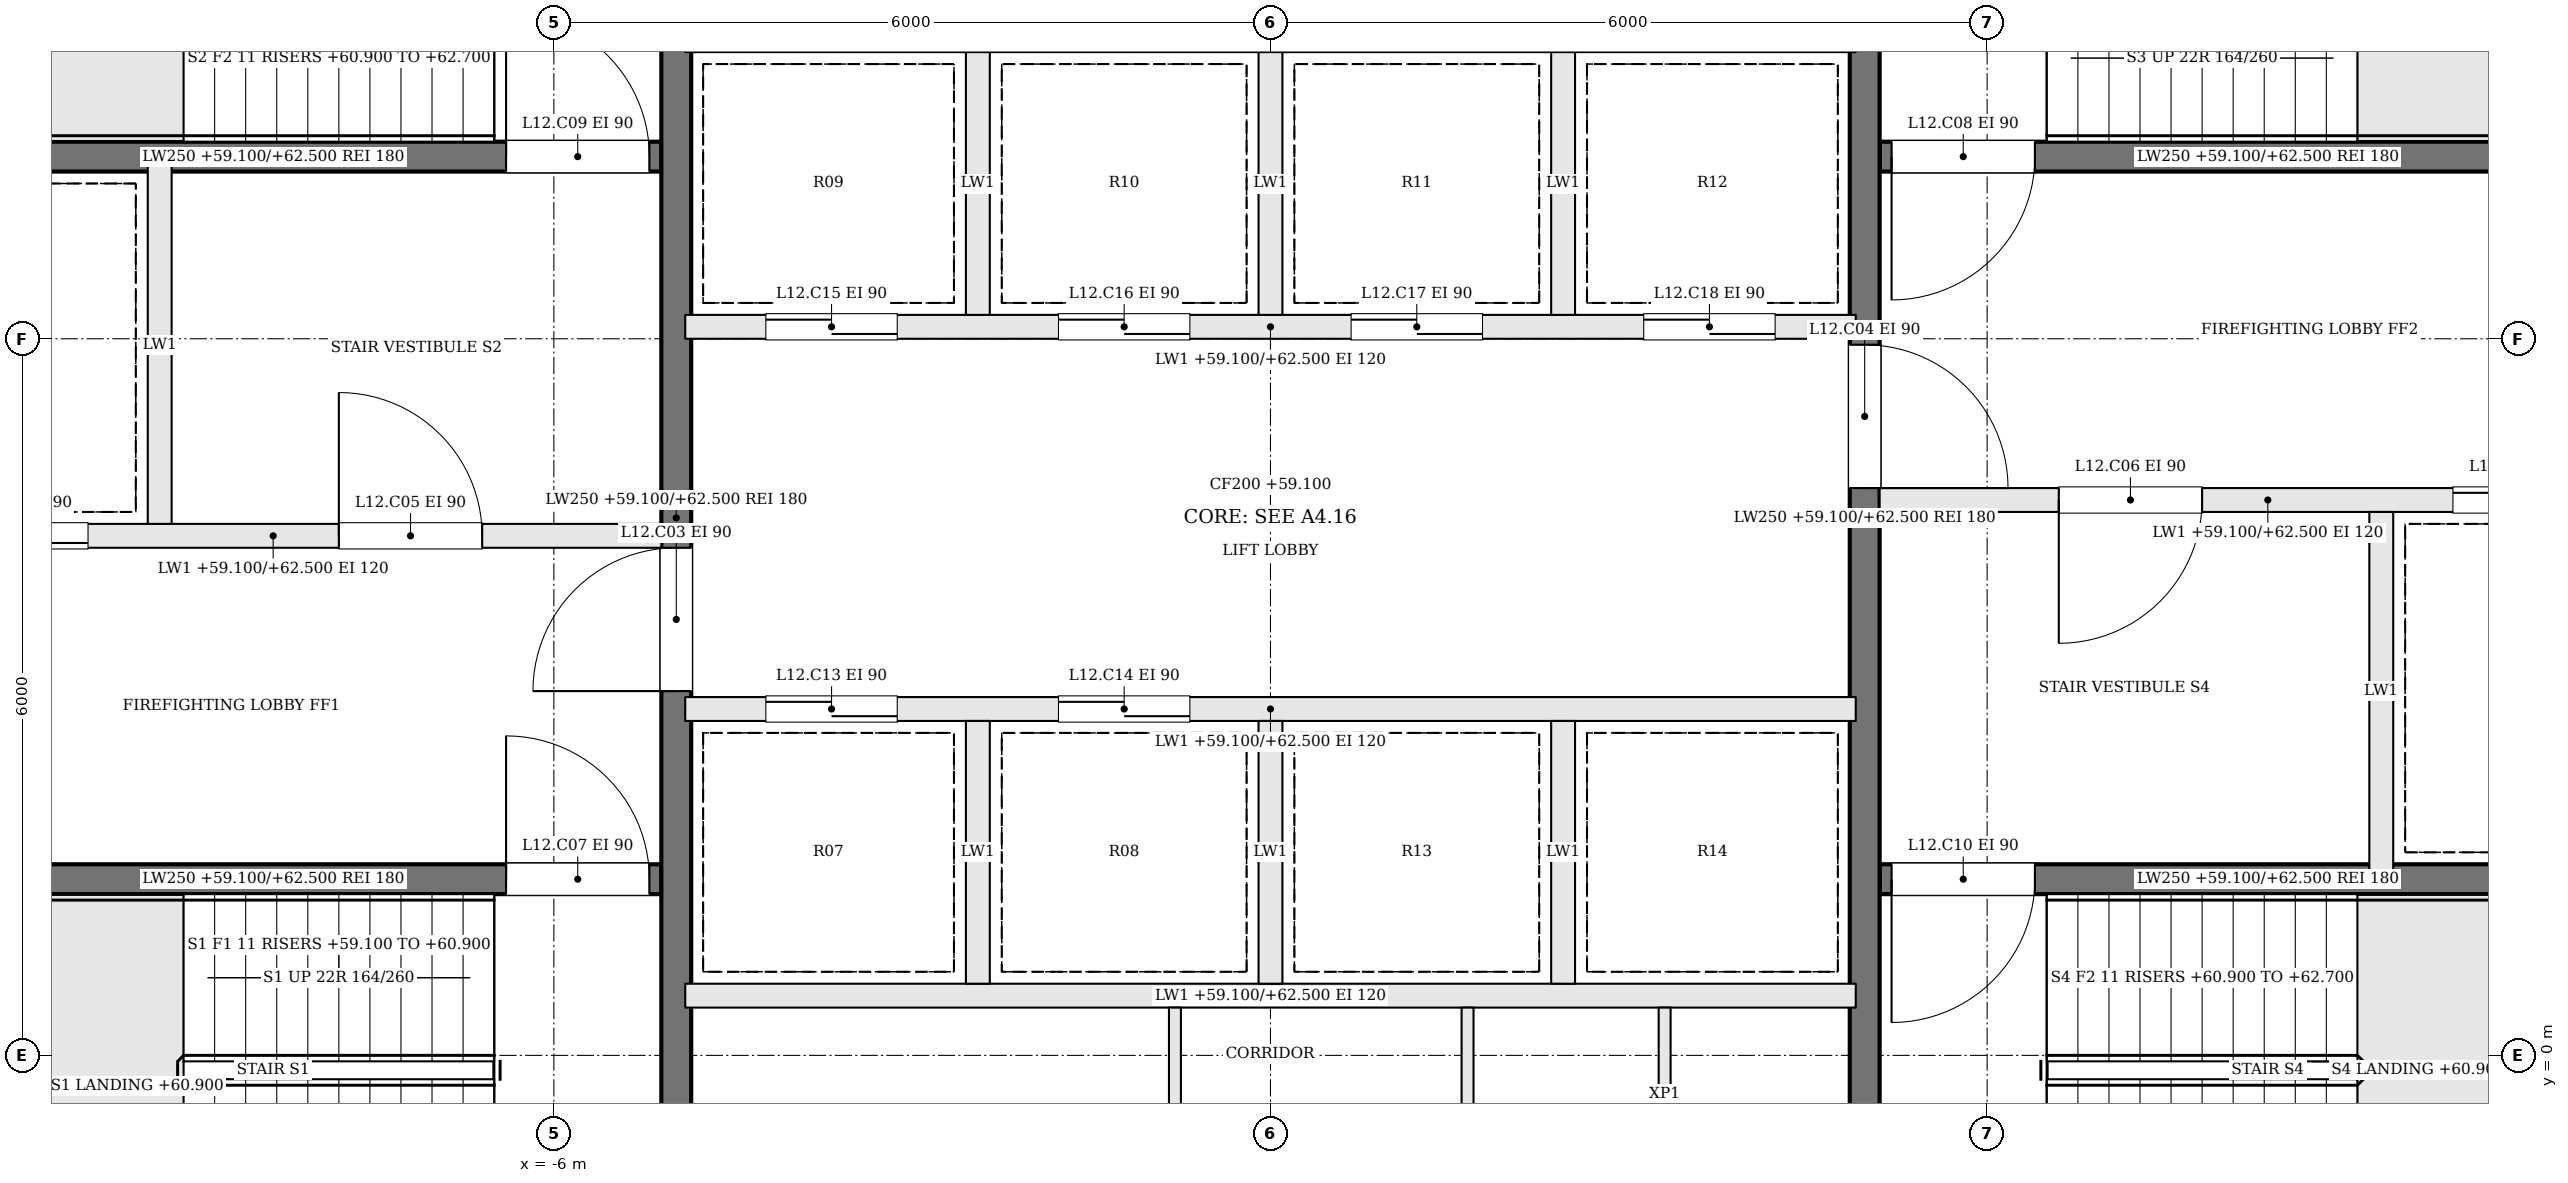
"""IFC4 building model, lengths in metres.
Left out: names, types, materials, properties, quantities, classifications, styles, units other than length and angle.
Written with IfcOpenShell. Run it as: python <this file> out.ifc"""

import sys

from ifc_helpers import new_model, si_unit, direction, frame, frame_2d, origin, place, context, subcontext, project, spatial, rectangle, extrude, element, fill, save


model = new_model("IFC4")
c1 = context("Model", 3, precision=1e-05, world=origin(), true_north=direction((0.0, 1.0)))
c2 = subcontext(c1, "Body", "Model", "MODEL_VIEW")
j1 = project(units=[si_unit("LENGTHUNIT", "METRE"), si_unit("PLANEANGLEUNIT", "RADIAN")], contexts=[c1])
p1 = place(None, origin())
s1 = spatial("IfcSite", under=j1, at=p1, CompositionType="ELEMENT")
p2 = place(p1, origin())
s2 = spatial("IfcBuilding", under=s1, at=p2, CompositionType="ELEMENT")
p3 = place(p2, frame((0.0, 0.0, 59.1)))
s3 = spatial("IfcBuildingStorey", under=s2, at=p3, CompositionType="ELEMENT", Elevation=59.1)
p4 = place(p3, frame((-11.6, 1.475, 0.0), z_axis=(0.0, 0.0, 1.0), x_axis=(1.0, 0.0, 0.0)))
e1 = element("IfcWall", 1, at=p4, inside=s3, PredefinedType="SOLIDWALL", context=c2, shape_type="SweptSolid", body=[
    extrude(rectangle(XDim=6.5, YDim=0.25, at=frame_2d((3.25, 0.0))), origin(), (0.0, 0.0, 1.0), 3.4),
])
p5 = place(p4, frame((5.2, 0.0, 0.0)))
e2 = element("IfcOpeningElement", 2, at=p5, cuts=e1, PredefinedType="OPENING", context=c2, shape_type="SweptSolid", body=[
    extrude(rectangle(XDim=1.2, YDim=2.1, at=frame_2d((0.6, 1.05))), frame((0.0, 0.135, 0.0), z_axis=(0.0, -1.0, 0.0), x_axis=(1.0, 0.0, 0.0)), (0.0, 0.0, 1.0), 0.27),
])
p6 = place(p3, frame((11.6, 7.525, 0.0), z_axis=(0.0, 0.0, 1.0), x_axis=(-1.0, 0.0, 0.0)))
e3 = element("IfcWall", 3, at=p6, inside=s3, PredefinedType="SOLIDWALL", context=c2, shape_type="SweptSolid", body=[
    extrude(rectangle(XDim=6.5, YDim=0.25, at=frame_2d((3.25, 0.0))), origin(), (0.0, 0.0, 1.0), 3.4),
])
p7 = place(p6, frame((5.2, 0.0, 0.0)))
e4 = element("IfcOpeningElement", 4, at=p7, cuts=e3, PredefinedType="OPENING", context=c2, shape_type="SweptSolid", body=[
    extrude(rectangle(XDim=1.2, YDim=2.1, at=frame_2d((0.6, 1.05))), frame((0.0, 0.135, 0.0), z_axis=(0.0, -1.0, 0.0), x_axis=(1.0, 0.0, 0.0)), (0.0, 0.0, 1.0), 0.27),
])
p8 = place(p3, frame((-11.6, 4.35, 0.0), z_axis=(0.0, 0.0, 1.0), x_axis=(1.0, 0.0, 0.0)))
e5 = element("IfcWall", 5, at=p8, inside=s3, PredefinedType="SOLIDWALL", context=c2, shape_type="SweptSolid", body=[
    extrude(rectangle(XDim=6.5, YDim=0.2, at=frame_2d((3.25, 0.0))), origin(), (0.0, 0.0, 1.0), 3.4),
])
p9 = place(p8, frame((3.8, 0.0, 0.0)))
e6 = element("IfcOpeningElement", 6, at=p9, cuts=e5, PredefinedType="OPENING", context=c2, shape_type="SweptSolid", body=[
    extrude(rectangle(XDim=1.2, YDim=2.1, at=frame_2d((0.6, 1.05))), frame((0.0, 0.11, 0.0), z_axis=(0.0, -1.0, 0.0), x_axis=(1.0, 0.0, 0.0)), (0.0, 0.0, 1.0), 0.22),
])
p10 = place(p8, frame((0.5, 0.0, 0.0)))
e7 = element("IfcOpeningElement", 7, at=p10, cuts=e5, PredefinedType="OPENING", context=c2, shape_type="SweptSolid", body=[
    extrude(rectangle(XDim=1.2, YDim=2.1, at=frame_2d((0.6, 1.05))), frame((0.0, 0.11, 0.0), z_axis=(0.0, -1.0, 0.0), x_axis=(1.0, 0.0, 0.0)), (0.0, 0.0, 1.0), 0.22),
])
p11 = place(p3, frame((11.6, 4.65, 0.0), z_axis=(0.0, 0.0, 1.0), x_axis=(-1.0, 0.0, 0.0)))
e8 = element("IfcWall", 8, at=p11, inside=s3, PredefinedType="SOLIDWALL", context=c2, shape_type="SweptSolid", body=[
    extrude(rectangle(XDim=6.5, YDim=0.2, at=frame_2d((3.25, 0.0))), origin(), (0.0, 0.0, 1.0), 3.4),
])
p12 = place(p11, frame((3.8, 0.0, 0.0)))
e9 = element("IfcOpeningElement", 9, at=p12, cuts=e8, PredefinedType="OPENING", context=c2, shape_type="SweptSolid", body=[
    extrude(rectangle(XDim=1.2, YDim=2.1, at=frame_2d((0.6, 1.05))), frame((0.0, 0.11, 0.0), z_axis=(0.0, -1.0, 0.0), x_axis=(1.0, 0.0, 0.0)), (0.0, 0.0, 1.0), 0.22),
])
p13 = place(p11, frame((0.5, 0.0, 0.0)))
e10 = element("IfcOpeningElement", 10, at=p13, cuts=e8, PredefinedType="OPENING", context=c2, shape_type="SweptSolid", body=[
    extrude(rectangle(XDim=1.2, YDim=2.1, at=frame_2d((0.6, 1.05))), frame((0.0, 0.11, 0.0), z_axis=(0.0, -1.0, 0.0), x_axis=(1.0, 0.0, 0.0)), (0.0, 0.0, 1.0), 0.22),
])
p14 = place(p3, frame((-11.6, 7.525, 0.0), z_axis=(0.0, 0.0, 1.0), x_axis=(1.0, 0.0, 0.0)))
e11 = element("IfcWall", 11, at=p14, inside=s3, PredefinedType="SOLIDWALL", context=c2, shape_type="SweptSolid", body=[
    extrude(rectangle(XDim=6.5, YDim=0.25, at=frame_2d((3.25, 0.0))), origin(), (0.0, 0.0, 1.0), 3.4),
])
p15 = place(p14, frame((5.2, 0.0, 0.0)))
e12 = element("IfcOpeningElement", 12, at=p15, cuts=e11, PredefinedType="OPENING", context=c2, shape_type="SweptSolid", body=[
    extrude(rectangle(XDim=1.2, YDim=2.1, at=frame_2d((0.6, 1.05))), frame((0.0, 0.135, 0.0), z_axis=(0.0, -1.0, 0.0), x_axis=(1.0, 0.0, 0.0)), (0.0, 0.0, 1.0), 0.27),
])
p16 = place(p3, frame((11.6, 1.475, 0.0), z_axis=(0.0, 0.0, 1.0), x_axis=(-1.0, 0.0, 0.0)))
e13 = element("IfcWall", 13, at=p16, inside=s3, PredefinedType="SOLIDWALL", context=c2, shape_type="SweptSolid", body=[
    extrude(rectangle(XDim=6.5, YDim=0.25, at=frame_2d((3.25, 0.0))), origin(), (0.0, 0.0, 1.0), 3.4),
])
p17 = place(p16, frame((5.2, 0.0, 0.0)))
e14 = element("IfcOpeningElement", 14, at=p17, cuts=e13, PredefinedType="OPENING", context=c2, shape_type="SweptSolid", body=[
    extrude(rectangle(XDim=1.2, YDim=2.1, at=frame_2d((0.6, 1.05))), frame((0.0, 0.135, 0.0), z_axis=(0.0, -1.0, 0.0), x_axis=(1.0, 0.0, 0.0)), (0.0, 0.0, 1.0), 0.27),
])
for number, where, z_axis, x_axis in (
    (15, (-9.3, 4.45, 0.0), (0.0, 0.0, 1.0), (0.0, 1.0, 0.0)),
    (16, (9.3, 4.55, 0.0), (0.0, 0.0, 1.0), (0.0, -1.0, 0.0)),
):
    element("IfcWall", number, at=place(p3, frame(where, z_axis=z_axis, x_axis=x_axis)), inside=s3, PredefinedType="SOLIDWALL", context=c2, shape_type="SweptSolid", body=[
        extrude(rectangle(XDim=3.0, YDim=0.2, at=frame_2d((1.5, 0.0))), origin(), (0.0, 0.0, 1.0), 3.4),
    ])
p18 = place(p3, frame((-4.975, -1.6, 0.0), z_axis=(0.0, 0.0, 1.0), x_axis=(0.0, 1.0, 0.0)))
e17 = element("IfcWall", 17, at=p18, inside=s3, PredefinedType="SOLIDWALL", context=c2, shape_type="SweptSolid", body=[
    extrude(rectangle(XDim=12.2, YDim=0.25, at=frame_2d((6.1, 0.0))), origin(), (0.0, 0.0, 1.0), 3.4),
])
p19 = place(p18, frame((4.65, 0.0, 0.0)))
e18 = element("IfcOpeningElement", 18, at=p19, cuts=e17, PredefinedType="OPENING", context=c2, shape_type="SweptSolid", body=[
    extrude(rectangle(XDim=1.2, YDim=2.1, at=frame_2d((0.6, 1.05))), frame((0.0, 0.135, 0.0), z_axis=(0.0, -1.0, 0.0), x_axis=(1.0, 0.0, 0.0)), (0.0, 0.0, 1.0), 0.27),
])
p20 = place(p3, frame((4.975, 10.6, 0.0), z_axis=(0.0, 0.0, 1.0), x_axis=(0.0, -1.0, 0.0)))
e19 = element("IfcWall", 19, at=p20, inside=s3, PredefinedType="SOLIDWALL", context=c2, shape_type="SweptSolid", body=[
    extrude(rectangle(XDim=12.2, YDim=0.25, at=frame_2d((6.1, 0.0))), origin(), (0.0, 0.0, 1.0), 3.4),
])
p21 = place(p20, frame((4.65, 0.0, 0.0)))
e20 = element("IfcOpeningElement", 20, at=p21, cuts=e19, PredefinedType="OPENING", context=c2, shape_type="SweptSolid", body=[
    extrude(rectangle(XDim=1.2, YDim=2.1, at=frame_2d((0.6, 1.05))), frame((0.0, 0.135, 0.0), z_axis=(0.0, -1.0, 0.0), x_axis=(1.0, 0.0, 0.0)), (0.0, 0.0, 1.0), 0.27),
])
p22 = place(p3, frame((-4.9, 0.5, 0.0), z_axis=(0.0, 0.0, 1.0), x_axis=(1.0, 0.0, 0.0)))
e21 = element("IfcWall", 21, at=p22, inside=s3, PredefinedType="SOLIDWALL", context=c2, shape_type="SweptSolid", body=[
    extrude(rectangle(XDim=9.8, YDim=0.2, at=frame_2d((4.9, 0.0))), origin(), (0.0, 0.0, 1.0), 3.4),
])
p23 = place(p3, frame((-4.9, 2.9, 0.0), z_axis=(0.0, 0.0, 1.0), x_axis=(1.0, 0.0, 0.0)))
e22 = element("IfcWall", 22, at=p23, inside=s3, PredefinedType="SOLIDWALL", context=c2, shape_type="SweptSolid", body=[
    extrude(rectangle(XDim=9.8, YDim=0.2, at=frame_2d((4.9, 0.0))), origin(), (0.0, 0.0, 1.0), 3.4),
])
p24 = place(p23, frame((0.675, 0.0, 0.0)))
e23 = element("IfcOpeningElement", 23, at=p24, cuts=e22, PredefinedType="OPENING", context=c2, shape_type="SweptSolid", body=[
    extrude(rectangle(XDim=1.1, YDim=2.1, at=frame_2d((0.55, 1.05))), frame((0.0, 0.11, 0.0), z_axis=(0.0, -1.0, 0.0), x_axis=(1.0, 0.0, 0.0)), (0.0, 0.0, 1.0), 0.22),
])
p25 = place(p23, frame((3.125, 0.0, 0.0)))
e24 = element("IfcOpeningElement", 24, at=p25, cuts=e22, PredefinedType="OPENING", context=c2, shape_type="SweptSolid", body=[
    extrude(rectangle(XDim=1.1, YDim=2.1, at=frame_2d((0.55, 1.05))), frame((0.0, 0.11, 0.0), z_axis=(0.0, -1.0, 0.0), x_axis=(1.0, 0.0, 0.0)), (0.0, 0.0, 1.0), 0.22),
])
p26 = place(p3, frame((-4.9, 6.1, 0.0), z_axis=(0.0, 0.0, 1.0), x_axis=(1.0, 0.0, 0.0)))
e25 = element("IfcWall", 25, at=p26, inside=s3, PredefinedType="SOLIDWALL", context=c2, shape_type="SweptSolid", body=[
    extrude(rectangle(XDim=9.8, YDim=0.2, at=frame_2d((4.9, 0.0))), origin(), (0.0, 0.0, 1.0), 3.4),
])
p27 = place(p26, frame((0.675, 0.0, 0.0)))
e26 = element("IfcOpeningElement", 26, at=p27, cuts=e25, PredefinedType="OPENING", context=c2, shape_type="SweptSolid", body=[
    extrude(rectangle(XDim=1.1, YDim=2.1, at=frame_2d((0.55, 1.05))), frame((0.0, 0.11, 0.0), z_axis=(0.0, -1.0, 0.0), x_axis=(1.0, 0.0, 0.0)), (0.0, 0.0, 1.0), 0.22),
])
p28 = place(p26, frame((3.125, 0.0, 0.0)))
e27 = element("IfcOpeningElement", 27, at=p28, cuts=e25, PredefinedType="OPENING", context=c2, shape_type="SweptSolid", body=[
    extrude(rectangle(XDim=1.1, YDim=2.1, at=frame_2d((0.55, 1.05))), frame((0.0, 0.11, 0.0), z_axis=(0.0, -1.0, 0.0), x_axis=(1.0, 0.0, 0.0)), (0.0, 0.0, 1.0), 0.22),
])
p29 = place(p26, frame((5.575, 0.0, 0.0)))
e28 = element("IfcOpeningElement", 28, at=p29, cuts=e25, PredefinedType="OPENING", context=c2, shape_type="SweptSolid", body=[
    extrude(rectangle(XDim=1.1, YDim=2.1, at=frame_2d((0.55, 1.05))), frame((0.0, 0.11, 0.0), z_axis=(0.0, -1.0, 0.0), x_axis=(1.0, 0.0, 0.0)), (0.0, 0.0, 1.0), 0.22),
])
p30 = place(p26, frame((8.025, 0.0, 0.0)))
e29 = element("IfcOpeningElement", 29, at=p30, cuts=e25, PredefinedType="OPENING", context=c2, shape_type="SweptSolid", body=[
    extrude(rectangle(XDim=1.1, YDim=2.1, at=frame_2d((0.55, 1.05))), frame((0.0, 0.11, 0.0), z_axis=(0.0, -1.0, 0.0), x_axis=(1.0, 0.0, 0.0)), (0.0, 0.0, 1.0), 0.22),
])
for number, where, z_axis, x_axis in (
    (30, (-2.45, 0.6, 0.0), (0.0, 0.0, 1.0), (0.0, 1.0, 0.0)),
    (31, (0.0, 0.6, 0.0), (0.0, 0.0, 1.0), (0.0, 1.0, 0.0)),
    (32, (2.45, 0.6, 0.0), (0.0, 0.0, 1.0), (0.0, 1.0, 0.0)),
    (33, (-2.45, 6.2, 0.0), (0.0, 0.0, 1.0), (0.0, 1.0, 0.0)),
    (34, (0.0, 6.2, 0.0), (0.0, 0.0, 1.0), (0.0, 1.0, 0.0)),
    (35, (2.45, 6.2, 0.0), (0.0, 0.0, 1.0), (0.0, 1.0, 0.0)),
):
    element("IfcWall", number, at=place(p3, frame(where, z_axis=z_axis, x_axis=x_axis)), inside=s3, PredefinedType="SOLIDWALL", context=c2, shape_type="SweptSolid", body=[
        extrude(rectangle(XDim=2.2, YDim=0.2, at=frame_2d((1.1, 0.0))), origin(), (0.0, 0.0, 1.0), 3.4),
    ])
for number, where, z_axis, x_axis in (
    (36, (-0.8, -1.6, 0.0), (0.0, 0.0, 1.0), (0.0, 1.0, 0.0)),
    (37, (1.65, -1.6, 0.0), (0.0, 0.0, 1.0), (0.0, 1.0, 0.0)),
    (38, (3.3, -1.6, 0.0), (0.0, 0.0, 1.0), (0.0, 1.0, 0.0)),
):
    element("IfcWall", number, at=place(p3, frame(where, z_axis=z_axis, x_axis=x_axis)), inside=s3, PredefinedType="PARTITIONING", context=c2, shape_type="SweptSolid", body=[
        extrude(rectangle(XDim=2.0, YDim=0.1, at=frame_2d((1.0, 0.0))), origin(), (0.0, 0.0, 1.0), 3.4),
    ])
p31 = place(p19, origin())
e39 = element("IfcDoor", 39, at=p31, inside=s3, OperationType="SINGLE_SWING_LEFT", PredefinedType="DOOR", context=c2, shape_type="SweptSolid", body=[
    extrude(rectangle(XDim=1.2, YDim=2.1, at=frame_2d((0.6, 1.05))), frame((0.0, 0.025, 0.0), z_axis=(0.0, -1.0, 0.0), x_axis=(1.0, 0.0, 0.0)), (0.0, 0.0, 1.0), 0.05),
])
fill(e18, e39)
p32 = place(p21, origin())
e40 = element("IfcDoor", 40, at=p32, inside=s3, OperationType="SINGLE_SWING_RIGHT", PredefinedType="DOOR", context=c2, shape_type="SweptSolid", body=[
    extrude(rectangle(XDim=1.2, YDim=2.1, at=frame_2d((0.6, 1.05))), frame((0.0, 0.025, 0.0), z_axis=(0.0, -1.0, 0.0), x_axis=(1.0, 0.0, 0.0)), (0.0, 0.0, 1.0), 0.05),
])
fill(e20, e40)
p33 = place(p9, origin())
e41 = element("IfcDoor", 41, at=p33, inside=s3, OperationType="SINGLE_SWING_LEFT", PredefinedType="DOOR", context=c2, shape_type="SweptSolid", body=[
    extrude(rectangle(XDim=1.2, YDim=2.1, at=frame_2d((0.6, 1.05))), frame((0.0, 0.025, 0.0), z_axis=(0.0, -1.0, 0.0), x_axis=(1.0, 0.0, 0.0)), (0.0, 0.0, 1.0), 0.05),
])
fill(e6, e41)
p34 = place(p12, origin())
e42 = element("IfcDoor", 42, at=p34, inside=s3, OperationType="SINGLE_SWING_RIGHT", PredefinedType="DOOR", context=c2, shape_type="SweptSolid", body=[
    extrude(rectangle(XDim=1.2, YDim=2.1, at=frame_2d((0.6, 1.05))), frame((0.0, 0.025, 0.0), z_axis=(0.0, -1.0, 0.0), x_axis=(1.0, 0.0, 0.0)), (0.0, 0.0, 1.0), 0.05),
])
fill(e9, e42)
p35 = place(p5, origin())
e43 = element("IfcDoor", 43, at=p35, inside=s3, OperationType="SINGLE_SWING_LEFT", PredefinedType="DOOR", context=c2, shape_type="SweptSolid", body=[
    extrude(rectangle(XDim=1.2, YDim=2.1, at=frame_2d((0.6, 1.05))), frame((0.0, 0.025, 0.0), z_axis=(0.0, -1.0, 0.0), x_axis=(1.0, 0.0, 0.0)), (0.0, 0.0, 1.0), 0.05),
])
fill(e2, e43)
p36 = place(p7, origin())
e44 = element("IfcDoor", 44, at=p36, inside=s3, OperationType="SINGLE_SWING_RIGHT", PredefinedType="DOOR", context=c2, shape_type="SweptSolid", body=[
    extrude(rectangle(XDim=1.2, YDim=2.1, at=frame_2d((0.6, 1.05))), frame((0.0, 0.025, 0.0), z_axis=(0.0, -1.0, 0.0), x_axis=(1.0, 0.0, 0.0)), (0.0, 0.0, 1.0), 0.05),
])
fill(e4, e44)
p37 = place(p15, origin())
e45 = element("IfcDoor", 45, at=p37, inside=s3, OperationType="SINGLE_SWING_LEFT", PredefinedType="DOOR", context=c2, shape_type="SweptSolid", body=[
    extrude(rectangle(XDim=1.2, YDim=2.1, at=frame_2d((0.6, 1.05))), frame((0.0, 0.025, 0.0), z_axis=(0.0, -1.0, 0.0), x_axis=(1.0, 0.0, 0.0)), (0.0, 0.0, 1.0), 0.05),
])
fill(e12, e45)
p38 = place(p17, origin())
e46 = element("IfcDoor", 46, at=p38, inside=s3, OperationType="SINGLE_SWING_RIGHT", PredefinedType="DOOR", context=c2, shape_type="SweptSolid", body=[
    extrude(rectangle(XDim=1.2, YDim=2.1, at=frame_2d((0.6, 1.05))), frame((0.0, 0.025, 0.0), z_axis=(0.0, -1.0, 0.0), x_axis=(1.0, 0.0, 0.0)), (0.0, 0.0, 1.0), 0.05),
])
fill(e14, e46)
p39 = place(p10, origin())
e47 = element("IfcDoor", 47, at=p39, inside=s3, OperationType="SLIDING_TO_RIGHT", PredefinedType="DOOR", context=c2, shape_type="SweptSolid", body=[
    extrude(rectangle(XDim=1.2, YDim=2.1, at=frame_2d((0.6, 1.05))), frame((0.0, 0.025, 0.0), z_axis=(0.0, -1.0, 0.0), x_axis=(1.0, 0.0, 0.0)), (0.0, 0.0, 1.0), 0.05),
])
fill(e7, e47)
p40 = place(p13, origin())
e48 = element("IfcDoor", 48, at=p40, inside=s3, OperationType="SLIDING_TO_RIGHT", PredefinedType="DOOR", context=c2, shape_type="SweptSolid", body=[
    extrude(rectangle(XDim=1.2, YDim=2.1, at=frame_2d((0.6, 1.05))), frame((0.0, 0.025, 0.0), z_axis=(0.0, -1.0, 0.0), x_axis=(1.0, 0.0, 0.0)), (0.0, 0.0, 1.0), 0.05),
])
fill(e10, e48)
p41 = place(p24, origin())
e49 = element("IfcDoor", 49, at=p41, inside=s3, OperationType="SLIDING_TO_RIGHT", PredefinedType="DOOR", context=c2, shape_type="SweptSolid", body=[
    extrude(rectangle(XDim=1.1, YDim=2.1, at=frame_2d((0.55, 1.05))), frame((0.0, 0.025, 0.0), z_axis=(0.0, -1.0, 0.0), x_axis=(1.0, 0.0, 0.0)), (0.0, 0.0, 1.0), 0.05),
])
fill(e23, e49)
p42 = place(p25, origin())
e50 = element("IfcDoor", 50, at=p42, inside=s3, OperationType="SLIDING_TO_LEFT", PredefinedType="DOOR", context=c2, shape_type="SweptSolid", body=[
    extrude(rectangle(XDim=1.1, YDim=2.1, at=frame_2d((0.55, 1.05))), frame((0.0, 0.025, 0.0), z_axis=(0.0, -1.0, 0.0), x_axis=(1.0, 0.0, 0.0)), (0.0, 0.0, 1.0), 0.05),
])
fill(e24, e50)
p43 = place(p27, origin())
e51 = element("IfcDoor", 51, at=p43, inside=s3, OperationType="SLIDING_TO_RIGHT", PredefinedType="DOOR", context=c2, shape_type="SweptSolid", body=[
    extrude(rectangle(XDim=1.1, YDim=2.1, at=frame_2d((0.55, 1.05))), frame((0.0, 0.025, 0.0), z_axis=(0.0, -1.0, 0.0), x_axis=(1.0, 0.0, 0.0)), (0.0, 0.0, 1.0), 0.05),
])
fill(e26, e51)
p44 = place(p28, origin())
e52 = element("IfcDoor", 52, at=p44, inside=s3, OperationType="SLIDING_TO_LEFT", PredefinedType="DOOR", context=c2, shape_type="SweptSolid", body=[
    extrude(rectangle(XDim=1.1, YDim=2.1, at=frame_2d((0.55, 1.05))), frame((0.0, 0.025, 0.0), z_axis=(0.0, -1.0, 0.0), x_axis=(1.0, 0.0, 0.0)), (0.0, 0.0, 1.0), 0.05),
])
fill(e27, e52)
p45 = place(p29, origin())
e53 = element("IfcDoor", 53, at=p45, inside=s3, OperationType="SLIDING_TO_RIGHT", PredefinedType="DOOR", context=c2, shape_type="SweptSolid", body=[
    extrude(rectangle(XDim=1.1, YDim=2.1, at=frame_2d((0.55, 1.05))), frame((0.0, 0.025, 0.0), z_axis=(0.0, -1.0, 0.0), x_axis=(1.0, 0.0, 0.0)), (0.0, 0.0, 1.0), 0.05),
])
fill(e28, e53)
p46 = place(p30, origin())
e54 = element("IfcDoor", 54, at=p46, inside=s3, OperationType="SLIDING_TO_LEFT", PredefinedType="DOOR", context=c2, shape_type="SweptSolid", body=[
    extrude(rectangle(XDim=1.1, YDim=2.1, at=frame_2d((0.55, 1.05))), frame((0.0, 0.025, 0.0), z_axis=(0.0, -1.0, 0.0), x_axis=(1.0, 0.0, 0.0)), (0.0, 0.0, 1.0), 0.05),
])
fill(e29, e54)
save(model, sys.argv[1])
